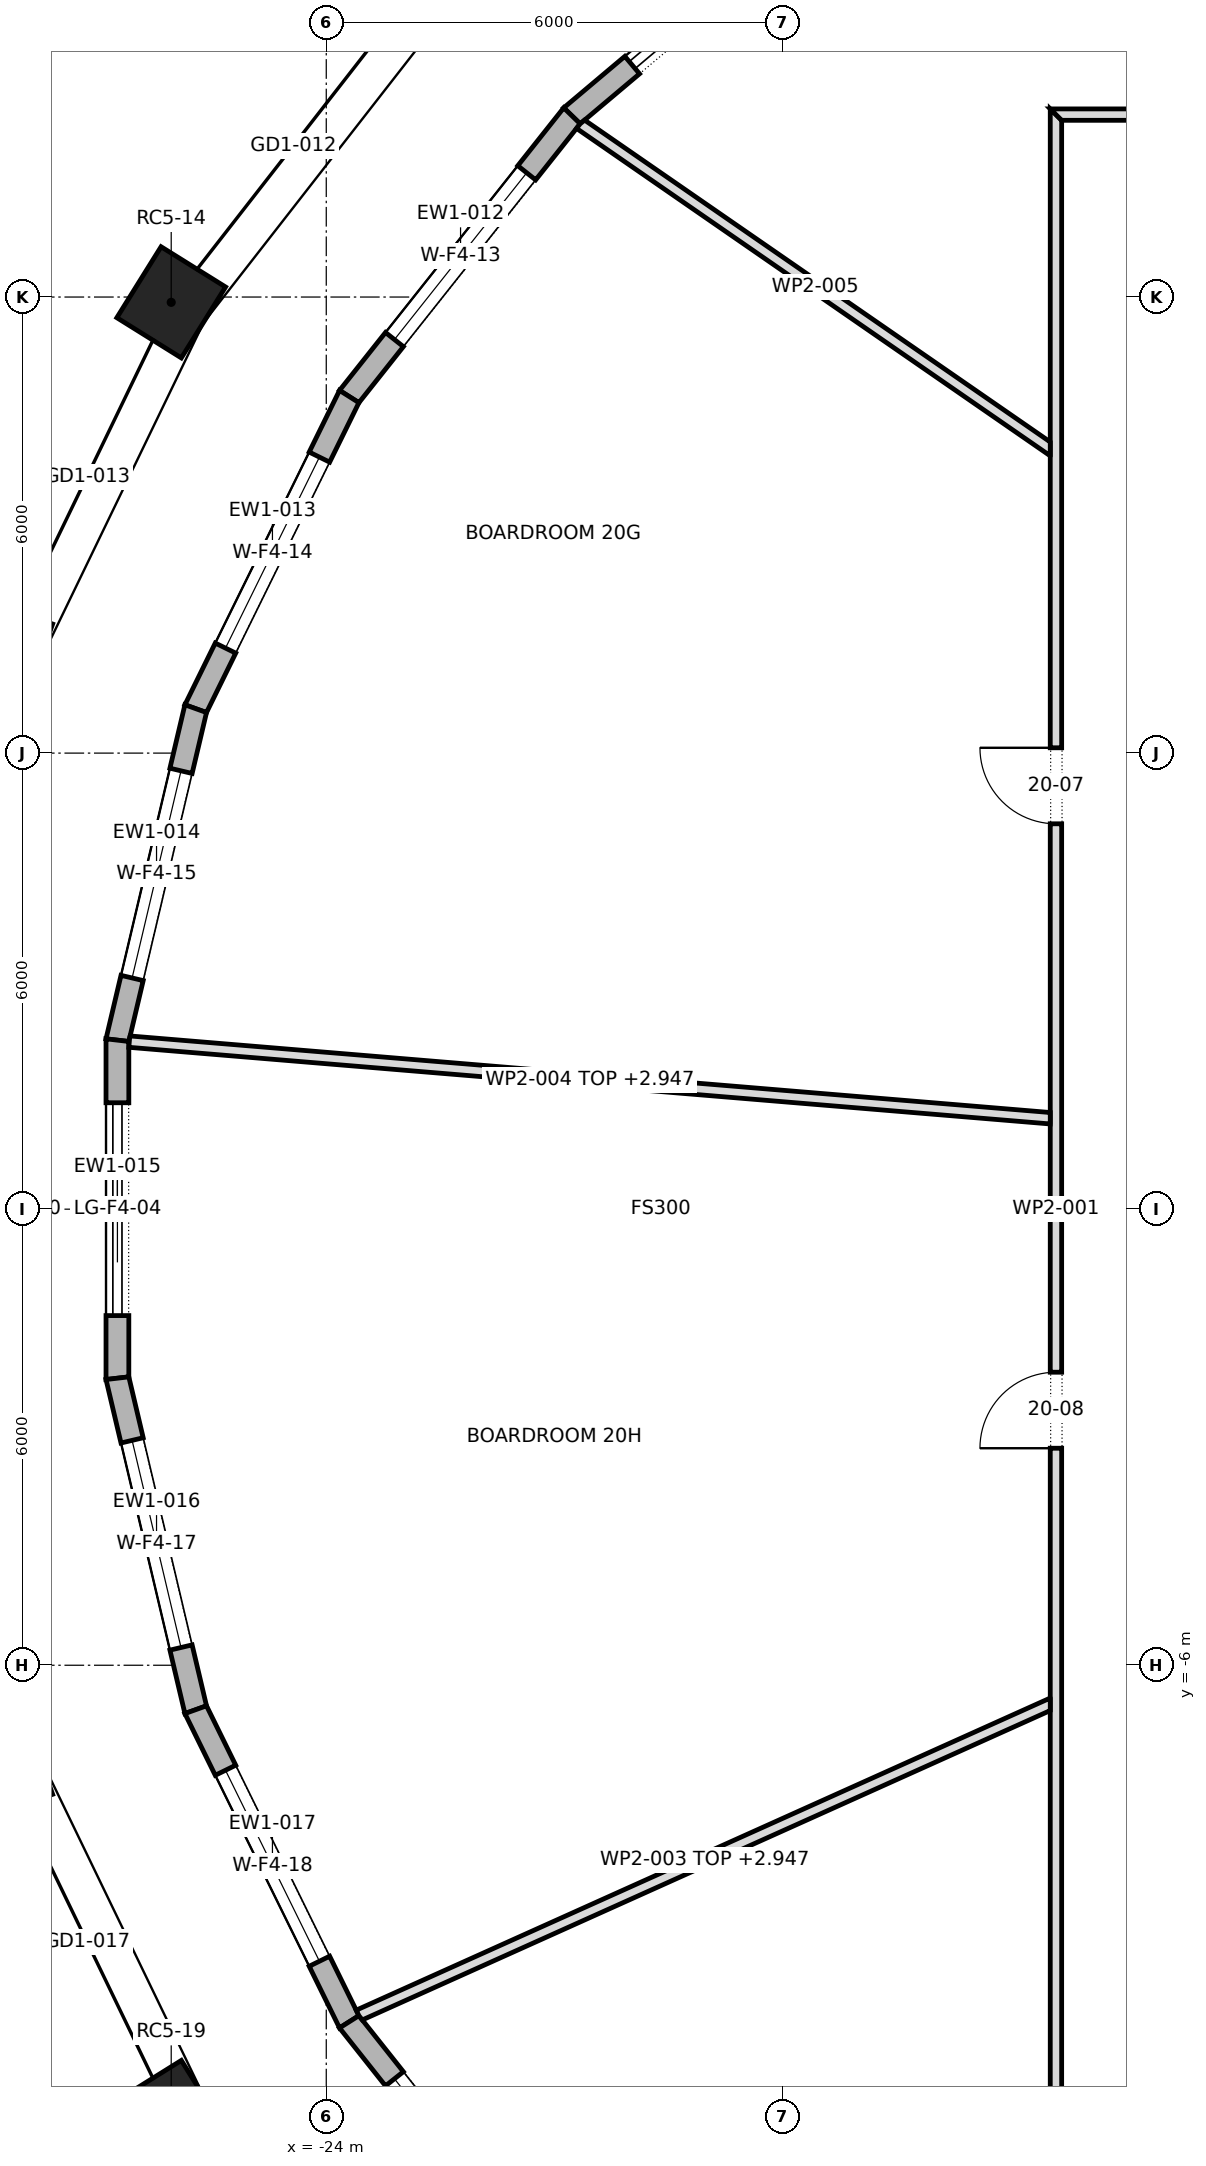
"""IFC4 building model, lengths in metres.
Left out: names, types, materials, properties, quantities, classifications, styles, units other than length and angle.
Written with IfcOpenShell. Run it as: python <this file> out.ifc"""

import sys

from ifc_helpers import new_model, si_unit, direction, frame, frame_2d, origin, origin_2d, place, context, subcontext, project, spatial, polyline, rectangle, outline, extrude, element, fill, save


model = new_model("IFC4")
c1 = context("Model", 3, precision=1e-05, world=origin(), true_north=direction((0.0, 1.0)))
c2 = subcontext(c1, "Body", "Model", "MODEL_VIEW")
j1 = project(units=[si_unit("LENGTHUNIT", "METRE"), si_unit("PLANEANGLEUNIT", "RADIAN")], contexts=[c1])
p1 = place(None, origin())
s1 = spatial("IfcSite", under=j1, at=p1, CompositionType="ELEMENT")
p2 = place(p1, origin())
s2 = spatial("IfcBuilding", under=s1, at=p2, CompositionType="ELEMENT")
p3 = place(p2, frame((0.0, 0.0, 280.3)))
s3 = spatial("IfcBuildingStorey", under=s2, at=p3, CompositionType="ELEMENT", Elevation=280.3)
for number, where, z_axis, x_axis in (
    (1, (-26.04, 11.93, 0.0), (0.0, 0.0, 1.0), (-0.529, -0.849, 0.0)),
    (2, (-28.255, 7.347, 0.0), (0.0, 0.0, 1.0), (-0.334, -0.943, 0.0)),
    (3, (-28.255, -7.347, 0.0), (0.0, 0.0, 1.0), (0.334, -0.943, 0.0)),
    (4, (-26.04, -11.93, 0.0), (0.0, 0.0, 1.0), (0.529, -0.849, 0.0)),
):
    element("IfcColumn", number, at=place(p3, frame(where, z_axis=z_axis, x_axis=x_axis)), inside=s3, PredefinedType="COLUMN", context=c2, shape_type="SweptSolid", body=[
        extrude(rectangle(XDim=1.1, YDim=1.0, at=origin_2d()), origin(), (0.0, 0.0, 1.0), 4.0),
    ])
p4 = place(p3, frame((-17.041, 17.523, 0.0), z_axis=(0.0, 0.0, 1.0), x_axis=(-0.764876116592, -0.644177402792, 0.0)))
e5 = element("IfcWall", 5, at=p4, inside=s3, PredefinedType="STANDARD", context=c2, shape_type="SweptSolid", body=[
    extrude(outline(polyline([(-0.014, -0.15), (4.888, -0.15), (4.858, 0.15), (0.014, 0.15), (-0.014, -0.15)])), origin(), (0.0, 0.0, 1.0), 3.7),
])
p5 = place(p4, frame((1.036, 0.0, 0.0)))
e6 = element("IfcOpeningElement", 6, at=p5, cuts=e5, PredefinedType="OPENING", context=c2, shape_type="SweptSolid", body=[
    extrude(rectangle(XDim=2.8, YDim=3.25, at=frame_2d((1.4, 1.625))), frame((0.0, 0.162, 0.0), z_axis=(0.0, -1.0, 0.0), x_axis=(1.0, 0.0, 0.0)), (0.0, 0.0, 1.0), 0.324),
])
p6 = place(p3, frame((-20.768, 14.384, 0.0), z_axis=(0.0, 0.0, 1.0), x_axis=(-0.621544881236, -0.783378555112, 0.0)))
e7 = element("IfcWall", 7, at=p6, inside=s3, PredefinedType="STANDARD", context=c2, shape_type="SweptSolid", body=[
    extrude(outline(polyline([(-0.015, -0.15), (4.73, -0.15), (4.698, 0.15), (0.015, 0.15), (-0.015, -0.15)])), origin(), (0.0, 0.0, 1.0), 3.7),
])
p7 = place(p6, frame((0.957, 0.0, 0.6)))
e8 = element("IfcOpeningElement", 8, at=p7, cuts=e7, PredefinedType="OPENING", context=c2, shape_type="SweptSolid", body=[
    extrude(rectangle(XDim=2.8, YDim=2.65, at=frame_2d((1.4, 1.325))), frame((0.0, 0.162, 0.0), z_axis=(0.0, -1.0, 0.0), x_axis=(1.0, 0.0, 0.0)), (0.0, 0.0, 1.0), 0.324),
])
p8 = place(p3, frame((-23.698, 10.691, 0.0), z_axis=(0.0, 0.0, 1.0), x_axis=(-0.441335149795, -0.897342345794, 0.0)))
e9 = element("IfcWall", 9, at=p8, inside=s3, PredefinedType="STANDARD", context=c2, shape_type="SweptSolid", body=[
    extrude(outline(polyline([(-0.016, -0.15), (4.593, -0.15), (4.559, 0.15), (0.016, 0.15), (-0.016, -0.15)])), origin(), (0.0, 0.0, 1.0), 3.7),
])
p9 = place(p8, frame((0.888, 0.0, 0.6)))
e10 = element("IfcOpeningElement", 10, at=p9, cuts=e9, PredefinedType="OPENING", context=c2, shape_type="SweptSolid", body=[
    extrude(rectangle(XDim=2.8, YDim=2.65, at=frame_2d((1.4, 1.325))), frame((0.0, 0.162, 0.0), z_axis=(0.0, -1.0, 0.0), x_axis=(1.0, 0.0, 0.0)), (0.0, 0.0, 1.0), 0.324),
])
p10 = place(p3, frame((-25.718, 6.585, 0.0), z_axis=(0.0, 0.0, 1.0), x_axis=(-0.229862207503, -0.973223183839, 0.0)))
e11 = element("IfcWall", 11, at=p10, inside=s3, PredefinedType="STANDARD", context=c2, shape_type="SweptSolid", body=[
    extrude(outline(polyline([(-0.017, -0.15), (4.499, -0.15), (4.463, 0.15), (0.017, 0.15), (-0.017, -0.15)])), origin(), (0.0, 0.0, 1.0), 3.7),
])
p11 = place(p10, frame((0.841, 0.0, 0.6)))
e12 = element("IfcOpeningElement", 12, at=p11, cuts=e11, PredefinedType="OPENING", context=c2, shape_type="SweptSolid", body=[
    extrude(rectangle(XDim=2.8, YDim=2.65, at=frame_2d((1.4, 1.325))), frame((0.0, 0.162, 0.0), z_axis=(0.0, -1.0, 0.0), x_axis=(1.0, 0.0, 0.0)), (0.0, 0.0, 1.0), 0.324),
])
p12 = place(p3, frame((-26.748, 2.224, 0.0), z_axis=(0.0, 0.0, 1.0), x_axis=(0.0, -1.0, 0.0)))
e13 = element("IfcWall", 13, at=p12, inside=s3, PredefinedType="STANDARD", context=c2, shape_type="SweptSolid", body=[
    extrude(outline(polyline([(-0.018, -0.15), (4.465, -0.15), (4.43, 0.15), (0.018, 0.15), (-0.018, -0.15)])), origin(), (0.0, 0.0, 1.0), 3.7),
])
p13 = place(p12, frame((0.824, 0.0, 0.0)))
e14 = element("IfcOpeningElement", 14, at=p13, cuts=e13, PredefinedType="OPENING", context=c2, shape_type="SweptSolid", body=[
    extrude(rectangle(XDim=2.8, YDim=3.25, at=frame_2d((1.4, 1.625))), frame((0.0, 0.162, 0.0), z_axis=(0.0, -1.0, 0.0), x_axis=(1.0, 0.0, 0.0)), (0.0, 0.0, 1.0), 0.324),
])
p14 = place(p3, frame((-26.748, -2.224, 0.0), z_axis=(0.0, 0.0, 1.0), x_axis=(0.229862207503, -0.973223183839, 0.0)))
e15 = element("IfcWall", 15, at=p14, inside=s3, PredefinedType="STANDARD", context=c2, shape_type="SweptSolid", body=[
    extrude(outline(polyline([(-0.018, -0.15), (4.498, -0.15), (4.464, 0.15), (0.018, 0.15), (-0.018, -0.15)])), origin(), (0.0, 0.0, 1.0), 3.7),
])
p15 = place(p14, frame((0.841, 0.0, 0.6)))
e16 = element("IfcOpeningElement", 16, at=p15, cuts=e15, PredefinedType="OPENING", context=c2, shape_type="SweptSolid", body=[
    extrude(rectangle(XDim=2.8, YDim=2.65, at=frame_2d((1.4, 1.325))), frame((0.0, 0.162, 0.0), z_axis=(0.0, -1.0, 0.0), x_axis=(1.0, 0.0, 0.0)), (0.0, 0.0, 1.0), 0.324),
])
p16 = place(p3, frame((-25.718, -6.585, 0.0), z_axis=(0.0, 0.0, 1.0), x_axis=(0.441335149795, -0.897342345794, 0.0)))
e17 = element("IfcWall", 17, at=p16, inside=s3, PredefinedType="STANDARD", context=c2, shape_type="SweptSolid", body=[
    extrude(outline(polyline([(-0.017, -0.15), (4.592, -0.15), (4.56, 0.15), (0.017, 0.15), (-0.017, -0.15)])), origin(), (0.0, 0.0, 1.0), 3.7),
])
p17 = place(p16, frame((0.888, 0.0, 0.6)))
e18 = element("IfcOpeningElement", 18, at=p17, cuts=e17, PredefinedType="OPENING", context=c2, shape_type="SweptSolid", body=[
    extrude(rectangle(XDim=2.8, YDim=2.65, at=frame_2d((1.4, 1.325))), frame((0.0, 0.162, 0.0), z_axis=(0.0, -1.0, 0.0), x_axis=(1.0, 0.0, 0.0)), (0.0, 0.0, 1.0), 0.324),
])
p18 = place(p3, frame((-23.698, -10.691, 0.0), z_axis=(0.0, 0.0, 1.0), x_axis=(0.621544881236, -0.783378555112, 0.0)))
e19 = element("IfcWall", 19, at=p18, inside=s3, PredefinedType="STANDARD", context=c2, shape_type="SweptSolid", body=[
    extrude(outline(polyline([(-0.016, -0.15), (4.729, -0.15), (4.699, 0.15), (0.016, 0.15), (-0.016, -0.15)])), origin(), (0.0, 0.0, 1.0), 3.7),
])
p19 = place(p18, frame((0.957, 0.0, 0.6)))
e20 = element("IfcOpeningElement", 20, at=p19, cuts=e19, PredefinedType="OPENING", context=c2, shape_type="SweptSolid", body=[
    extrude(rectangle(XDim=2.8, YDim=2.65, at=frame_2d((1.4, 1.325))), frame((0.0, 0.162, 0.0), z_axis=(0.0, -1.0, 0.0), x_axis=(1.0, 0.0, 0.0)), (0.0, 0.0, 1.0), 0.324),
])
p20 = place(p3, frame((-14.4, -14.475, 0.0), z_axis=(0.0, 0.0, 1.0), x_axis=(0.0, 1.0, 0.0)))
e21 = element("IfcWall", 21, at=p20, inside=s3, PredefinedType="PARTITIONING", context=c2, shape_type="SweptSolid", body=[
    extrude(outline(polyline([(0.15, -0.075), (2.06, -0.075), (3.97, -0.075), (5.88, -0.075), (7.79, -0.075), (9.7, -0.075), (11.61, -0.075), (13.52, -0.075), (15.43, -0.075), (17.34, -0.075), (19.25, -0.075), (21.16, -0.075), (23.07, -0.075), (24.98, -0.075), (26.89, -0.075), (28.8, -0.075), (28.95, 0.075), (27.02, 0.075), (25.09, 0.075), (23.16, 0.075), (21.23, 0.075), (19.3, 0.075), (17.37, 0.075), (15.44, 0.075), (13.51, 0.075), (11.58, 0.075), (9.65, 0.075), (7.72, 0.075), (5.79, 0.075), (3.86, 0.075), (1.93, 0.075), (0.0, 0.075), (0.15, -0.075)])), origin(), (0.0, 0.0, 1.0), 3.7),
])
p21 = place(p20, frame((19.545, 0.0, 0.0)))
e22 = element("IfcOpeningElement", 22, at=p21, cuts=e21, PredefinedType="OPENING", context=c2, shape_type="SweptSolid", body=[
    extrude(rectangle(XDim=1.0, YDim=2.1, at=frame_2d((0.5, 1.05))), frame((0.0, 0.087, 0.0), z_axis=(0.0, -1.0, 0.0), x_axis=(1.0, 0.0, 0.0)), (0.0, 0.0, 1.0), 0.174),
])
p22 = place(p20, frame((11.33, 0.0, 0.0)))
e23 = element("IfcOpeningElement", 23, at=p22, cuts=e21, PredefinedType="OPENING", context=c2, shape_type="SweptSolid", body=[
    extrude(rectangle(XDim=1.0, YDim=2.1, at=frame_2d((0.5, 1.05))), frame((0.0, 0.087, 0.0), z_axis=(0.0, -1.0, 0.0), x_axis=(1.0, 0.0, 0.0)), (0.0, 0.0, 1.0), 0.174),
])
p23 = place(p3, frame((-14.445, -6.5, 0.0), z_axis=(0.0, 0.0, 1.0), x_axis=(-0.912008635086, -0.410171000351, 0.0)))
e24 = element("IfcWall", 24, at=p23, inside=s3, PredefinedType="PARTITIONING", context=c2, shape_type="SweptSolid", body=[
    extrude(outline(polyline([(10.011, -0.075), (10.011, -0.071), (10.009, 0.005), (9.991, 0.075), (8.006, 0.075), (6.021, 0.075), (4.037, 0.075), (2.052, 0.075), (0.067, 0.075), (0.0, -0.074), (0.0, -0.075), (1.668, -0.075), (3.337, -0.075), (5.006, -0.075), (6.674, -0.075), (8.343, -0.075), (10.011, -0.075)])), origin(), (0.0, 0.0, 1.0), 2.947),
])
p24 = place(p3, frame((-14.469, 1.196, 0.0), z_axis=(0.0, 0.0, 1.0), x_axis=(-0.996556684965, 0.08291425481, 0.0)))
e25 = element("IfcWall", 25, at=p24, inside=s3, PredefinedType="PARTITIONING", context=c2, shape_type="SweptSolid", body=[
    extrude(outline(polyline([(0.012, -0.075), (1.747, -0.075), (3.483, -0.075), (5.218, -0.075), (6.953, -0.075), (8.689, -0.075), (10.424, -0.075), (12.159, -0.075), (12.164, -0.045), (12.164, 0.075), (10.426, 0.075), (8.688, 0.075), (6.951, 0.075), (5.213, 0.075), (3.475, 0.075), (1.738, 0.075), (0.0, 0.075), (0.0, 0.07), (0.012, -0.075)])), origin(), (0.0, 0.0, 1.0), 2.947),
])
p25 = place(p3, frame((-14.433, 9.972, 0.0), z_axis=(0.0, 0.0, 1.0), x_axis=(-0.822596869136, 0.568625000231, 0.0)))
e26 = element("IfcWall", 26, at=p25, inside=s3, PredefinedType="PARTITIONING", context=c2, shape_type="SweptSolid", body=[
    extrude(outline(polyline([(0.103, -0.075), (1.965, -0.075), (3.827, -0.075), (5.689, -0.075), (7.551, -0.075), (7.571, -0.002), (7.576, 0.069), (7.576, 0.075), (5.682, 0.075), (3.788, 0.075), (1.894, 0.075), (0.0, 0.075), (0.0, 0.074), (0.103, -0.075)])), origin(), (0.0, 0.0, 1.0), 3.7),
])
p26 = place(p3, frame((-14.475, 14.4, 0.0), z_axis=(0.0, 0.0, 1.0), x_axis=(1.0, 0.0, 0.0)))
e27 = element("IfcWall", 27, at=p26, inside=s3, PredefinedType="PARTITIONING", context=c2, shape_type="SweptSolid", body=[
    extrude(outline(polyline([(0.15, -0.075), (2.06, -0.075), (3.97, -0.075), (5.88, -0.075), (7.79, -0.075), (9.7, -0.075), (11.61, -0.075), (13.52, -0.075), (15.43, -0.075), (17.34, -0.075), (19.25, -0.075), (21.16, -0.075), (23.07, -0.075), (24.98, -0.075), (26.89, -0.075), (28.8, -0.075), (28.95, 0.075), (27.02, 0.075), (25.09, 0.075), (23.16, 0.075), (21.23, 0.075), (19.3, 0.075), (17.37, 0.075), (15.44, 0.075), (13.51, 0.075), (11.58, 0.075), (9.65, 0.075), (7.72, 0.075), (5.79, 0.075), (3.86, 0.075), (1.93, 0.075), (0.0, 0.075), (0.15, -0.075)])), origin(), (0.0, 0.0, 1.0), 3.7),
])
p27 = place(p26, frame((20.15, 0.0, 0.0)))
e28 = element("IfcOpeningElement", 28, at=p27, cuts=e27, PredefinedType="OPENING", context=c2, shape_type="SweptSolid", body=[
    extrude(rectangle(XDim=1.0, YDim=2.1, at=frame_2d((0.5, 1.05))), frame((0.0, 0.087, 0.0), z_axis=(0.0, -1.0, 0.0), x_axis=(1.0, 0.0, 0.0)), (0.0, 0.0, 1.0), 0.174),
])
p28 = place(p26, frame((8.565, 0.0, 0.0)))
e29 = element("IfcOpeningElement", 29, at=p28, cuts=e27, PredefinedType="OPENING", context=c2, shape_type="SweptSolid", body=[
    extrude(rectangle(XDim=1.0, YDim=2.1, at=frame_2d((0.5, 1.05))), frame((0.0, 0.087, 0.0), z_axis=(0.0, -1.0, 0.0), x_axis=(1.0, 0.0, 0.0)), (0.0, 0.0, 1.0), 0.174),
])
p29 = place(p26, frame((2.205, 0.0, 0.0)))
e30 = element("IfcOpeningElement", 30, at=p29, cuts=e27, PredefinedType="OPENING", context=c2, shape_type="SweptSolid", body=[
    extrude(rectangle(XDim=1.0, YDim=2.1, at=frame_2d((0.5, 1.05))), frame((0.0, 0.087, 0.0), z_axis=(0.0, -1.0, 0.0), x_axis=(1.0, 0.0, 0.0)), (0.0, 0.0, 1.0), 0.174),
])
p30 = place(p5, origin())
e31 = element("IfcDoor", 31, at=p30, inside=s3, OperationType="DOUBLE_DOOR_SLIDING", PredefinedType="DOOR", context=c2, shape_type="SweptSolid", body=[
    extrude(rectangle(XDim=2.8, YDim=3.25, at=frame_2d((1.4, 1.625))), frame((0.0, 0.025, 0.0), z_axis=(0.0, -1.0, 0.0), x_axis=(1.0, 0.0, 0.0)), (0.0, 0.0, 1.0), 0.05),
])
fill(e6, e31)
p31 = place(p7, origin())
e32 = element("IfcWindow", 32, at=p31, inside=s3, PartitioningType="DOUBLE_PANEL_VERTICAL", PredefinedType="WINDOW", context=c2, shape_type="SweptSolid", body=[
    extrude(rectangle(XDim=2.8, YDim=2.65, at=frame_2d((1.4, 1.325))), frame((0.0, 0.03, 0.0), z_axis=(0.0, -1.0, 0.0), x_axis=(1.0, 0.0, 0.0)), (0.0, 0.0, 1.0), 0.06),
])
fill(e8, e32)
p32 = place(p9, origin())
e33 = element("IfcWindow", 33, at=p32, inside=s3, PartitioningType="DOUBLE_PANEL_VERTICAL", PredefinedType="WINDOW", context=c2, shape_type="SweptSolid", body=[
    extrude(rectangle(XDim=2.8, YDim=2.65, at=frame_2d((1.4, 1.325))), frame((0.0, 0.03, 0.0), z_axis=(0.0, -1.0, 0.0), x_axis=(1.0, 0.0, 0.0)), (0.0, 0.0, 1.0), 0.06),
])
fill(e10, e33)
p33 = place(p11, origin())
e34 = element("IfcWindow", 34, at=p33, inside=s3, PartitioningType="DOUBLE_PANEL_VERTICAL", PredefinedType="WINDOW", context=c2, shape_type="SweptSolid", body=[
    extrude(rectangle(XDim=2.8, YDim=2.65, at=frame_2d((1.4, 1.325))), frame((0.0, 0.03, 0.0), z_axis=(0.0, -1.0, 0.0), x_axis=(1.0, 0.0, 0.0)), (0.0, 0.0, 1.0), 0.06),
])
fill(e12, e34)
p34 = place(p13, origin())
e35 = element("IfcDoor", 35, at=p34, inside=s3, OperationType="DOUBLE_DOOR_SLIDING", PredefinedType="DOOR", context=c2, shape_type="SweptSolid", body=[
    extrude(rectangle(XDim=2.8, YDim=3.25, at=frame_2d((1.4, 1.625))), frame((0.0, 0.025, 0.0), z_axis=(0.0, -1.0, 0.0), x_axis=(1.0, 0.0, 0.0)), (0.0, 0.0, 1.0), 0.05),
])
fill(e14, e35)
p35 = place(p15, origin())
e36 = element("IfcWindow", 36, at=p35, inside=s3, PartitioningType="DOUBLE_PANEL_VERTICAL", PredefinedType="WINDOW", context=c2, shape_type="SweptSolid", body=[
    extrude(rectangle(XDim=2.8, YDim=2.65, at=frame_2d((1.4, 1.325))), frame((0.0, 0.03, 0.0), z_axis=(0.0, -1.0, 0.0), x_axis=(1.0, 0.0, 0.0)), (0.0, 0.0, 1.0), 0.06),
])
fill(e16, e36)
p36 = place(p17, origin())
e37 = element("IfcWindow", 37, at=p36, inside=s3, PartitioningType="DOUBLE_PANEL_VERTICAL", PredefinedType="WINDOW", context=c2, shape_type="SweptSolid", body=[
    extrude(rectangle(XDim=2.8, YDim=2.65, at=frame_2d((1.4, 1.325))), frame((0.0, 0.03, 0.0), z_axis=(0.0, -1.0, 0.0), x_axis=(1.0, 0.0, 0.0)), (0.0, 0.0, 1.0), 0.06),
])
fill(e18, e37)
p37 = place(p19, origin())
e38 = element("IfcWindow", 38, at=p37, inside=s3, PartitioningType="DOUBLE_PANEL_VERTICAL", PredefinedType="WINDOW", context=c2, shape_type="SweptSolid", body=[
    extrude(rectangle(XDim=2.8, YDim=2.65, at=frame_2d((1.4, 1.325))), frame((0.0, 0.03, 0.0), z_axis=(0.0, -1.0, 0.0), x_axis=(1.0, 0.0, 0.0)), (0.0, 0.0, 1.0), 0.06),
])
fill(e20, e38)
p38 = place(p21, origin())
e39 = element("IfcDoor", 39, at=p38, inside=s3, OperationType="SINGLE_SWING_LEFT", PredefinedType="DOOR", context=c2, shape_type="SweptSolid", body=[
    extrude(rectangle(XDim=1.0, YDim=2.1, at=frame_2d((0.5, 1.05))), frame((0.0, 0.025, 0.0), z_axis=(0.0, -1.0, 0.0), x_axis=(1.0, 0.0, 0.0)), (0.0, 0.0, 1.0), 0.05),
])
fill(e22, e39)
p39 = place(p22, origin())
e40 = element("IfcDoor", 40, at=p39, inside=s3, OperationType="SINGLE_SWING_RIGHT", PredefinedType="DOOR", context=c2, shape_type="SweptSolid", body=[
    extrude(rectangle(XDim=1.0, YDim=2.1, at=frame_2d((0.5, 1.05))), frame((0.0, 0.025, 0.0), z_axis=(0.0, -1.0, 0.0), x_axis=(1.0, 0.0, 0.0)), (0.0, 0.0, 1.0), 0.05),
])
fill(e23, e40)
save(model, sys.argv[1])
